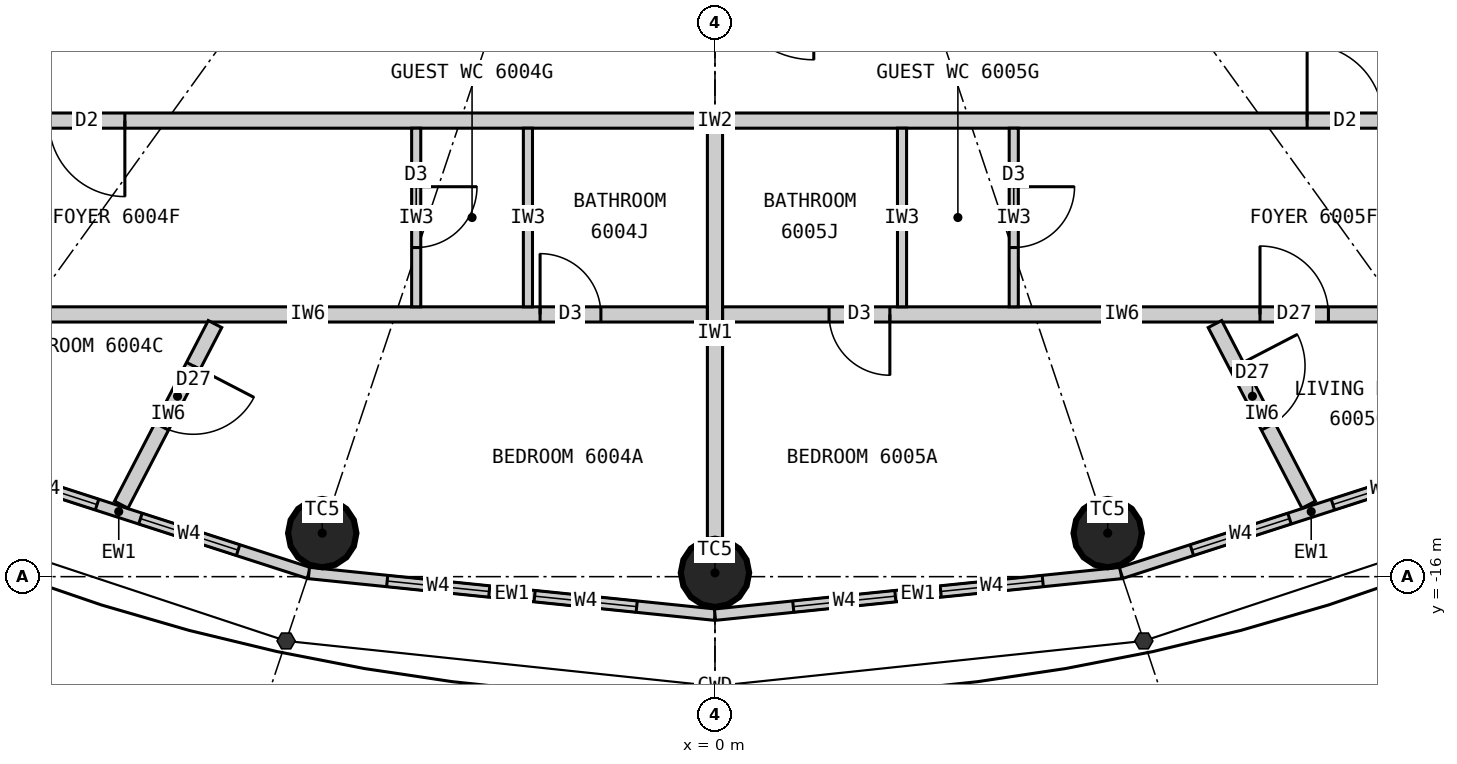
"""IFC4 building model, lengths in metres.
Left out: names, types, materials, properties, quantities, classifications, styles, units other than length and angle.
Written with IfcOpenShell. Run it as: python <this file> out.ifc"""

import sys

from ifc_helpers import new_model, si_unit, direction, frame, frame_2d, origin, origin_2d, place, context, subcontext, project, spatial, rectangle, circle, extrude, element, fill, save


model = new_model("IFC4")
c1 = context("Model", 3, precision=1e-05, world=origin(), true_north=direction((0.0, 1.0)))
c2 = subcontext(c1, "Body", "Model", "MODEL_VIEW")
j1 = project(units=[si_unit("LENGTHUNIT", "METRE"), si_unit("PLANEANGLEUNIT", "RADIAN")], contexts=[c1])
p1 = place(None, origin())
s1 = spatial("IfcSite", under=j1, at=p1, CompositionType="ELEMENT")
p2 = place(p1, origin())
s2 = spatial("IfcBuilding", under=s1, at=p2, CompositionType="ELEMENT")
p3 = place(p2, frame((0.0, 0.0, 222.6)))
s3 = spatial("IfcBuildingStorey", under=s2, at=p3, CompositionType="ELEMENT", Elevation=222.6)
for number, where, z_axis, x_axis in (
    (1, (-5.167, -15.427, 0.0), (0.0, 0.0, 1.0), (1.0, 0.0, 0.0)),
    (2, (0.0, -15.95, 0.0), (0.0, 0.0, 1.0), (1.0, 0.0, 0.0)),
    (3, (5.167, -15.427, 0.0), (0.0, 0.0, 1.0), (1.0, 0.0, 0.0)),
):
    element("IfcColumn", number, at=place(p3, frame(where, z_axis=z_axis, x_axis=x_axis)), inside=s3, PredefinedType="COLUMN", context=c2, shape_type="SweptSolid", body=[
        extrude(circle(Radius=0.45, at=origin_2d()), origin(), (0.0, 0.0, 1.0), 3.3),
    ])
p4 = place(p3, frame((-10.346, -14.336, 0.0), z_axis=(0.0, 0.0, 1.0), x_axis=(0.951644702515, -0.307200846638, 0.0)))
e4 = element("IfcWall", 4, at=p4, inside=s3, PredefinedType="ELEMENTEDWALL", context=c2, shape_type="SweptSolid", body=[
    extrude(rectangle(XDim=5.258, YDim=0.15, at=frame_2d((2.629, 0.0))), origin(), (0.0, 0.0, 1.0), 3.12),
])
p5 = place(p4, frame((0.979, 0.0, 0.9)))
e5 = element("IfcOpeningElement", 5, at=p5, cuts=e4, PredefinedType="OPENING", context=c2, shape_type="SweptSolid", body=[
    extrude(rectangle(XDim=1.35, YDim=1.9, at=frame_2d((0.675, 0.95))), frame((0.0, 0.085, 0.0), z_axis=(0.0, -1.0, 0.0), x_axis=(1.0, 0.0, 0.0)), (0.0, 0.0, 1.0), 0.17),
])
p6 = place(p4, frame((2.929, 0.0, 0.9)))
e6 = element("IfcOpeningElement", 6, at=p6, cuts=e4, PredefinedType="OPENING", context=c2, shape_type="SweptSolid", body=[
    extrude(rectangle(XDim=1.35, YDim=1.9, at=frame_2d((0.675, 0.95))), frame((0.0, 0.085, 0.0), z_axis=(0.0, -1.0, 0.0), x_axis=(1.0, 0.0, 0.0)), (0.0, 0.0, 1.0), 0.17),
])
p7 = place(p3, frame((-5.343, -15.952, 0.0), z_axis=(0.0, 0.0, 1.0), x_axis=(0.994774574972, -0.102095763818, 0.0)))
e7 = element("IfcWall", 7, at=p7, inside=s3, PredefinedType="ELEMENTEDWALL", context=c2, shape_type="SweptSolid", body=[
    extrude(rectangle(XDim=5.371, YDim=0.15, at=frame_2d((2.686, 0.0))), origin(), (0.0, 0.0, 1.0), 3.12),
])
p8 = place(p7, frame((1.035, 0.0, 0.9)))
e8 = element("IfcOpeningElement", 8, at=p8, cuts=e7, PredefinedType="OPENING", context=c2, shape_type="SweptSolid", body=[
    extrude(rectangle(XDim=1.35, YDim=1.9, at=frame_2d((0.675, 0.95))), frame((0.0, 0.085, 0.0), z_axis=(0.0, -1.0, 0.0), x_axis=(1.0, 0.0, 0.0)), (0.0, 0.0, 1.0), 0.17),
])
p9 = place(p7, frame((2.985, 0.0, 0.9)))
e9 = element("IfcOpeningElement", 9, at=p9, cuts=e7, PredefinedType="OPENING", context=c2, shape_type="SweptSolid", body=[
    extrude(rectangle(XDim=1.35, YDim=1.9, at=frame_2d((0.675, 0.95))), frame((0.0, 0.085, 0.0), z_axis=(0.0, -1.0, 0.0), x_axis=(1.0, 0.0, 0.0)), (0.0, 0.0, 1.0), 0.17),
])
p10 = place(p3, frame((0.0, -16.5, 0.0), z_axis=(0.0, 0.0, 1.0), x_axis=(0.994774574972, 0.102095763818, 0.0)))
e10 = element("IfcWall", 10, at=p10, inside=s3, PredefinedType="ELEMENTEDWALL", context=c2, shape_type="SweptSolid", body=[
    extrude(rectangle(XDim=5.371, YDim=0.15, at=frame_2d((2.686, 0.0))), origin(), (0.0, 0.0, 1.0), 3.12),
])
p11 = place(p10, frame((1.035, 0.0, 0.9)))
e11 = element("IfcOpeningElement", 11, at=p11, cuts=e10, PredefinedType="OPENING", context=c2, shape_type="SweptSolid", body=[
    extrude(rectangle(XDim=1.35, YDim=1.9, at=frame_2d((0.675, 0.95))), frame((0.0, 0.085, 0.0), z_axis=(0.0, -1.0, 0.0), x_axis=(1.0, 0.0, 0.0)), (0.0, 0.0, 1.0), 0.17),
])
p12 = place(p10, frame((2.985, 0.0, 0.9)))
e12 = element("IfcOpeningElement", 12, at=p12, cuts=e10, PredefinedType="OPENING", context=c2, shape_type="SweptSolid", body=[
    extrude(rectangle(XDim=1.35, YDim=1.9, at=frame_2d((0.675, 0.95))), frame((0.0, 0.085, 0.0), z_axis=(0.0, -1.0, 0.0), x_axis=(1.0, 0.0, 0.0)), (0.0, 0.0, 1.0), 0.17),
])
p13 = place(p3, frame((5.343, -15.952, 0.0), z_axis=(0.0, 0.0, 1.0), x_axis=(0.951644702515, 0.307200846638, 0.0)))
e13 = element("IfcWall", 13, at=p13, inside=s3, PredefinedType="ELEMENTEDWALL", context=c2, shape_type="SweptSolid", body=[
    extrude(rectangle(XDim=5.258, YDim=0.15, at=frame_2d((2.629, 0.0))), origin(), (0.0, 0.0, 1.0), 3.12),
])
p14 = place(p13, frame((0.979, 0.0, 0.9)))
e14 = element("IfcOpeningElement", 14, at=p14, cuts=e13, PredefinedType="OPENING", context=c2, shape_type="SweptSolid", body=[
    extrude(rectangle(XDim=1.35, YDim=1.9, at=frame_2d((0.675, 0.95))), frame((0.0, 0.085, 0.0), z_axis=(0.0, -1.0, 0.0), x_axis=(1.0, 0.0, 0.0)), (0.0, 0.0, 1.0), 0.17),
])
p15 = place(p13, frame((2.929, 0.0, 0.9)))
e15 = element("IfcOpeningElement", 15, at=p15, cuts=e13, PredefinedType="OPENING", context=c2, shape_type="SweptSolid", body=[
    extrude(rectangle(XDim=1.35, YDim=1.9, at=frame_2d((0.675, 0.95))), frame((0.0, 0.085, 0.0), z_axis=(0.0, -1.0, 0.0), x_axis=(1.0, 0.0, 0.0)), (0.0, 0.0, 1.0), 0.17),
])
p16 = place(p3, frame((11.1, -10.0, 0.0), z_axis=(0.0, 0.0, 1.0), x_axis=(-1.0, 0.0, 0.0)))
e16 = element("IfcWall", 16, at=p16, inside=s3, PredefinedType="PARTITIONING", context=c2, shape_type="SweptSolid", body=[
    extrude(rectangle(XDim=22.2, YDim=0.2, at=frame_2d((11.1, 0.0))), origin(), (0.0, 0.0, 1.0), 3.12),
])
p17 = place(p16, frame((18.864, 0.0, 0.0)))
e17 = element("IfcOpeningElement", 17, at=p17, cuts=e16, PredefinedType="OPENING", context=c2, shape_type="SweptSolid", body=[
    extrude(rectangle(XDim=1.0, YDim=2.2, at=frame_2d((0.5, 1.1))), frame((0.0, 0.11, 0.0), z_axis=(0.0, -1.0, 0.0), x_axis=(1.0, 0.0, 0.0)), (0.0, 0.0, 1.0), 0.22),
])
p18 = place(p16, frame((2.309, 0.0, 0.0)))
e18 = element("IfcOpeningElement", 18, at=p18, cuts=e16, PredefinedType="OPENING", context=c2, shape_type="SweptSolid", body=[
    extrude(rectangle(XDim=1.0, YDim=2.2, at=frame_2d((0.5, 1.1))), frame((0.0, 0.11, 0.0), z_axis=(0.0, -1.0, 0.0), x_axis=(1.0, 0.0, 0.0)), (0.0, 0.0, 1.0), 0.22),
])
p19 = place(p3, frame((0.0, -10.1, 0.0), z_axis=(0.0, 0.0, 1.0), x_axis=(0.0, -1.0, 0.0)))
e19 = element("IfcWall", 19, at=p19, inside=s3, PredefinedType="PARTITIONING", context=c2, shape_type="SweptSolid", body=[
    extrude(rectangle(XDim=5.4, YDim=0.2, at=frame_2d((2.7, 0.0))), origin(), (0.0, 0.0, 1.0), 2.42),
])
p20 = place(p3, frame((-10.609, -12.55, 0.0), z_axis=(0.0, 0.0, 1.0), x_axis=(1.0, 0.0, 0.0)))
e20 = element("IfcWall", 20, at=p20, inside=s3, PredefinedType="PARTITIONING", context=c2, shape_type="SweptSolid", body=[
    extrude(rectangle(XDim=10.508, YDim=0.2, at=frame_2d((5.254, 0.0))), origin(), (0.0, 0.0, 1.0), 3.12),
])
p21 = place(p20, frame((8.308, 0.0, 0.0)))
e21 = element("IfcOpeningElement", 21, at=p21, cuts=e20, PredefinedType="OPENING", context=c2, shape_type="SweptSolid", body=[
    extrude(rectangle(XDim=0.8, YDim=2.1, at=frame_2d((0.4, 1.05))), frame((0.0, 0.11, 0.0), z_axis=(0.0, -1.0, 0.0), x_axis=(1.0, 0.0, 0.0)), (0.0, 0.0, 1.0), 0.22),
])
p22 = place(p3, frame((-6.578, -12.677, 0.0), z_axis=(0.0, 0.0, 1.0), x_axis=(-0.460620531465, -0.887597164255, 0.0)))
e22 = element("IfcWall", 22, at=p22, inside=s3, PredefinedType="PARTITIONING", context=c2, shape_type="SweptSolid", body=[
    extrude(rectangle(XDim=2.678, YDim=0.2, at=frame_2d((1.339, 0.0))), origin(), (0.0, 0.0, 1.0), 3.12),
])
p23 = place(p22, frame((0.62, 0.0, 0.0)))
e23 = element("IfcOpeningElement", 23, at=p23, cuts=e22, PredefinedType="OPENING", context=c2, shape_type="SweptSolid", body=[
    extrude(rectangle(XDim=0.9, YDim=2.1, at=frame_2d((0.45, 1.05))), frame((0.0, 0.11, 0.0), z_axis=(0.0, -1.0, 0.0), x_axis=(1.0, 0.0, 0.0)), (0.0, 0.0, 1.0), 0.22),
])
p24 = place(p3, frame((-3.931, -10.1, 0.0), z_axis=(0.0, 0.0, 1.0), x_axis=(0.0, -1.0, 0.0)))
e24 = element("IfcWall", 24, at=p24, inside=s3, PredefinedType="PARTITIONING", context=c2, shape_type="SweptSolid", body=[
    extrude(rectangle(XDim=2.35, YDim=0.12, at=frame_2d((1.175, 0.0))), origin(), (0.0, 0.0, 1.0), 3.12),
])
p25 = place(p24, frame((0.77, 0.0, 0.0)))
e25 = element("IfcOpeningElement", 25, at=p25, cuts=e24, PredefinedType="OPENING", context=c2, shape_type="SweptSolid", body=[
    extrude(rectangle(XDim=0.8, YDim=2.1, at=frame_2d((0.4, 1.05))), frame((0.0, 0.07, 0.0), z_axis=(0.0, -1.0, 0.0), x_axis=(1.0, 0.0, 0.0)), (0.0, 0.0, 1.0), 0.14),
])
p26 = place(p3, frame((-2.461, -10.1, 0.0), z_axis=(0.0, 0.0, 1.0), x_axis=(0.0, -1.0, 0.0)))
e26 = element("IfcWall", 26, at=p26, inside=s3, PredefinedType="PARTITIONING", context=c2, shape_type="SweptSolid", body=[
    extrude(rectangle(XDim=2.35, YDim=0.12, at=frame_2d((1.175, 0.0))), origin(), (0.0, 0.0, 1.0), 3.12),
])
p27 = place(p3, frame((0.101, -12.55, 0.0), z_axis=(0.0, 0.0, 1.0), x_axis=(1.0, 0.0, 0.0)))
e27 = element("IfcWall", 27, at=p27, inside=s3, PredefinedType="PARTITIONING", context=c2, shape_type="SweptSolid", body=[
    extrude(rectangle(XDim=10.508, YDim=0.2, at=frame_2d((5.254, 0.0))), origin(), (0.0, 0.0, 1.0), 3.12),
])
p28 = place(p27, frame((1.4, 0.0, 0.0)))
e28 = element("IfcOpeningElement", 28, at=p28, cuts=e27, PredefinedType="OPENING", context=c2, shape_type="SweptSolid", body=[
    extrude(rectangle(XDim=0.8, YDim=2.1, at=frame_2d((0.4, 1.05))), frame((0.0, 0.11, 0.0), z_axis=(0.0, -1.0, 0.0), x_axis=(1.0, 0.0, 0.0)), (0.0, 0.0, 1.0), 0.22),
])
p29 = place(p27, frame((7.07, 0.0, 0.0)))
e29 = element("IfcOpeningElement", 29, at=p29, cuts=e27, PredefinedType="OPENING", context=c2, shape_type="SweptSolid", body=[
    extrude(rectangle(XDim=0.9, YDim=2.1, at=frame_2d((0.45, 1.05))), frame((0.0, 0.11, 0.0), z_axis=(0.0, -1.0, 0.0), x_axis=(1.0, 0.0, 0.0)), (0.0, 0.0, 1.0), 0.22),
])
p30 = place(p3, frame((6.578, -12.677, 0.0), z_axis=(0.0, 0.0, 1.0), x_axis=(0.460620531465, -0.887597164255, 0.0)))
e30 = element("IfcWall", 30, at=p30, inside=s3, PredefinedType="PARTITIONING", context=c2, shape_type="SweptSolid", body=[
    extrude(rectangle(XDim=2.678, YDim=0.2, at=frame_2d((1.339, 0.0))), origin(), (0.0, 0.0, 1.0), 3.12),
])
p31 = place(p30, frame((0.62, 0.0, 0.0)))
e31 = element("IfcOpeningElement", 31, at=p31, cuts=e30, PredefinedType="OPENING", context=c2, shape_type="SweptSolid", body=[
    extrude(rectangle(XDim=0.9, YDim=2.1, at=frame_2d((0.45, 1.05))), frame((0.0, 0.11, 0.0), z_axis=(0.0, -1.0, 0.0), x_axis=(1.0, 0.0, 0.0)), (0.0, 0.0, 1.0), 0.22),
])
p32 = place(p3, frame((2.461, -10.1, 0.0), z_axis=(0.0, 0.0, 1.0), x_axis=(0.0, -1.0, 0.0)))
e32 = element("IfcWall", 32, at=p32, inside=s3, PredefinedType="PARTITIONING", context=c2, shape_type="SweptSolid", body=[
    extrude(rectangle(XDim=2.35, YDim=0.12, at=frame_2d((1.175, 0.0))), origin(), (0.0, 0.0, 1.0), 3.12),
])
p33 = place(p3, frame((3.931, -10.1, 0.0), z_axis=(0.0, 0.0, 1.0), x_axis=(0.0, -1.0, 0.0)))
e33 = element("IfcWall", 33, at=p33, inside=s3, PredefinedType="PARTITIONING", context=c2, shape_type="SweptSolid", body=[
    extrude(rectangle(XDim=2.35, YDim=0.12, at=frame_2d((1.175, 0.0))), origin(), (0.0, 0.0, 1.0), 3.12),
])
p34 = place(p33, frame((0.77, 0.0, 0.0)))
e34 = element("IfcOpeningElement", 34, at=p34, cuts=e33, PredefinedType="OPENING", context=c2, shape_type="SweptSolid", body=[
    extrude(rectangle(XDim=0.8, YDim=2.1, at=frame_2d((0.4, 1.05))), frame((0.0, 0.07, 0.0), z_axis=(0.0, -1.0, 0.0), x_axis=(1.0, 0.0, 0.0)), (0.0, 0.0, 1.0), 0.14),
])
p35 = place(p5, origin())
e35 = element("IfcWindow", 35, at=p35, inside=s3, PartitioningType="SINGLE_PANEL", PredefinedType="WINDOW", context=c2, shape_type="SweptSolid", body=[
    extrude(rectangle(XDim=1.35, YDim=1.9, at=frame_2d((0.675, 0.95))), frame((0.0, 0.03, 0.0), z_axis=(0.0, -1.0, 0.0), x_axis=(1.0, 0.0, 0.0)), (0.0, 0.0, 1.0), 0.06),
])
fill(e5, e35)
p36 = place(p6, origin())
e36 = element("IfcWindow", 36, at=p36, inside=s3, PartitioningType="SINGLE_PANEL", PredefinedType="WINDOW", context=c2, shape_type="SweptSolid", body=[
    extrude(rectangle(XDim=1.35, YDim=1.9, at=frame_2d((0.675, 0.95))), frame((0.0, 0.03, 0.0), z_axis=(0.0, -1.0, 0.0), x_axis=(1.0, 0.0, 0.0)), (0.0, 0.0, 1.0), 0.06),
])
fill(e6, e36)
p37 = place(p8, origin())
e37 = element("IfcWindow", 37, at=p37, inside=s3, PartitioningType="SINGLE_PANEL", PredefinedType="WINDOW", context=c2, shape_type="SweptSolid", body=[
    extrude(rectangle(XDim=1.35, YDim=1.9, at=frame_2d((0.675, 0.95))), frame((0.0, 0.03, 0.0), z_axis=(0.0, -1.0, 0.0), x_axis=(1.0, 0.0, 0.0)), (0.0, 0.0, 1.0), 0.06),
])
fill(e8, e37)
p38 = place(p9, origin())
e38 = element("IfcWindow", 38, at=p38, inside=s3, PartitioningType="SINGLE_PANEL", PredefinedType="WINDOW", context=c2, shape_type="SweptSolid", body=[
    extrude(rectangle(XDim=1.35, YDim=1.9, at=frame_2d((0.675, 0.95))), frame((0.0, 0.03, 0.0), z_axis=(0.0, -1.0, 0.0), x_axis=(1.0, 0.0, 0.0)), (0.0, 0.0, 1.0), 0.06),
])
fill(e9, e38)
p39 = place(p11, origin())
e39 = element("IfcWindow", 39, at=p39, inside=s3, PartitioningType="SINGLE_PANEL", PredefinedType="WINDOW", context=c2, shape_type="SweptSolid", body=[
    extrude(rectangle(XDim=1.35, YDim=1.9, at=frame_2d((0.675, 0.95))), frame((0.0, 0.03, 0.0), z_axis=(0.0, -1.0, 0.0), x_axis=(1.0, 0.0, 0.0)), (0.0, 0.0, 1.0), 0.06),
])
fill(e11, e39)
p40 = place(p12, origin())
e40 = element("IfcWindow", 40, at=p40, inside=s3, PartitioningType="SINGLE_PANEL", PredefinedType="WINDOW", context=c2, shape_type="SweptSolid", body=[
    extrude(rectangle(XDim=1.35, YDim=1.9, at=frame_2d((0.675, 0.95))), frame((0.0, 0.03, 0.0), z_axis=(0.0, -1.0, 0.0), x_axis=(1.0, 0.0, 0.0)), (0.0, 0.0, 1.0), 0.06),
])
fill(e12, e40)
p41 = place(p14, origin())
e41 = element("IfcWindow", 41, at=p41, inside=s3, PartitioningType="SINGLE_PANEL", PredefinedType="WINDOW", context=c2, shape_type="SweptSolid", body=[
    extrude(rectangle(XDim=1.35, YDim=1.9, at=frame_2d((0.675, 0.95))), frame((0.0, 0.03, 0.0), z_axis=(0.0, -1.0, 0.0), x_axis=(1.0, 0.0, 0.0)), (0.0, 0.0, 1.0), 0.06),
])
fill(e14, e41)
p42 = place(p15, origin())
e42 = element("IfcWindow", 42, at=p42, inside=s3, PartitioningType="SINGLE_PANEL", PredefinedType="WINDOW", context=c2, shape_type="SweptSolid", body=[
    extrude(rectangle(XDim=1.35, YDim=1.9, at=frame_2d((0.675, 0.95))), frame((0.0, 0.03, 0.0), z_axis=(0.0, -1.0, 0.0), x_axis=(1.0, 0.0, 0.0)), (0.0, 0.0, 1.0), 0.06),
])
fill(e15, e42)
p43 = place(p17, origin())
e43 = element("IfcDoor", 43, at=p43, inside=s3, OperationType="SINGLE_SWING_LEFT", PredefinedType="DOOR", context=c2, shape_type="SweptSolid", body=[
    extrude(rectangle(XDim=1.0, YDim=2.2, at=frame_2d((0.5, 1.1))), frame((0.0, 0.025, 0.0), z_axis=(0.0, -1.0, 0.0), x_axis=(1.0, 0.0, 0.0)), (0.0, 0.0, 1.0), 0.05),
])
fill(e17, e43)
p44 = place(p25, origin())
e44 = element("IfcDoor", 44, at=p44, inside=s3, OperationType="SINGLE_SWING_LEFT", PredefinedType="DOOR", context=c2, shape_type="SweptSolid", body=[
    extrude(rectangle(XDim=0.8, YDim=2.1, at=frame_2d((0.4, 1.05))), frame((0.0, 0.025, 0.0), z_axis=(0.0, -1.0, 0.0), x_axis=(1.0, 0.0, 0.0)), (0.0, 0.0, 1.0), 0.05),
])
fill(e25, e44)
p45 = place(p21, origin())
e45 = element("IfcDoor", 45, at=p45, inside=s3, OperationType="SINGLE_SWING_LEFT", PredefinedType="DOOR", context=c2, shape_type="SweptSolid", body=[
    extrude(rectangle(XDim=0.8, YDim=2.1, at=frame_2d((0.4, 1.05))), frame((0.0, 0.025, 0.0), z_axis=(0.0, -1.0, 0.0), x_axis=(1.0, 0.0, 0.0)), (0.0, 0.0, 1.0), 0.05),
])
fill(e21, e45)
p46 = place(p23, origin())
e46 = element("IfcDoor", 46, at=p46, inside=s3, OperationType="SINGLE_SWING_LEFT", PredefinedType="DOOR", context=c2, shape_type="SweptSolid", body=[
    extrude(rectangle(XDim=0.9, YDim=2.1, at=frame_2d((0.45, 1.05))), frame((0.0, 0.025, 0.0), z_axis=(0.0, -1.0, 0.0), x_axis=(1.0, 0.0, 0.0)), (0.0, 0.0, 1.0), 0.05),
])
fill(e23, e46)
p47 = place(p18, origin())
e47 = element("IfcDoor", 47, at=p47, inside=s3, OperationType="SINGLE_SWING_RIGHT", PredefinedType="DOOR", context=c2, shape_type="SweptSolid", body=[
    extrude(rectangle(XDim=1.0, YDim=2.2, at=frame_2d((0.5, 1.1))), frame((0.0, 0.025, 0.0), z_axis=(0.0, -1.0, 0.0), x_axis=(1.0, 0.0, 0.0)), (0.0, 0.0, 1.0), 0.05),
])
fill(e18, e47)
p48 = place(p28, origin())
e48 = element("IfcDoor", 48, at=p48, inside=s3, OperationType="SINGLE_SWING_RIGHT", PredefinedType="DOOR", context=c2, shape_type="SweptSolid", body=[
    extrude(rectangle(XDim=0.8, YDim=2.1, at=frame_2d((0.4, 1.05))), frame((0.0, 0.025, 0.0), z_axis=(0.0, -1.0, 0.0), x_axis=(1.0, 0.0, 0.0)), (0.0, 0.0, 1.0), 0.05),
])
fill(e28, e48)
p49 = place(p34, origin())
e49 = element("IfcDoor", 49, at=p49, inside=s3, OperationType="SINGLE_SWING_LEFT", PredefinedType="DOOR", context=c2, shape_type="SweptSolid", body=[
    extrude(rectangle(XDim=0.8, YDim=2.1, at=frame_2d((0.4, 1.05))), frame((0.0, 0.025, 0.0), z_axis=(0.0, -1.0, 0.0), x_axis=(1.0, 0.0, 0.0)), (0.0, 0.0, 1.0), 0.05),
])
fill(e34, e49)
p50 = place(p29, origin())
e50 = element("IfcDoor", 50, at=p50, inside=s3, OperationType="SINGLE_SWING_LEFT", PredefinedType="DOOR", context=c2, shape_type="SweptSolid", body=[
    extrude(rectangle(XDim=0.9, YDim=2.1, at=frame_2d((0.45, 1.05))), frame((0.0, 0.025, 0.0), z_axis=(0.0, -1.0, 0.0), x_axis=(1.0, 0.0, 0.0)), (0.0, 0.0, 1.0), 0.05),
])
fill(e29, e50)
p51 = place(p31, origin())
e51 = element("IfcDoor", 51, at=p51, inside=s3, OperationType="SINGLE_SWING_LEFT", PredefinedType="DOOR", context=c2, shape_type="SweptSolid", body=[
    extrude(rectangle(XDim=0.9, YDim=2.1, at=frame_2d((0.45, 1.05))), frame((0.0, 0.025, 0.0), z_axis=(0.0, -1.0, 0.0), x_axis=(1.0, 0.0, 0.0)), (0.0, 0.0, 1.0), 0.05),
])
fill(e31, e51)
save(model, sys.argv[1])
